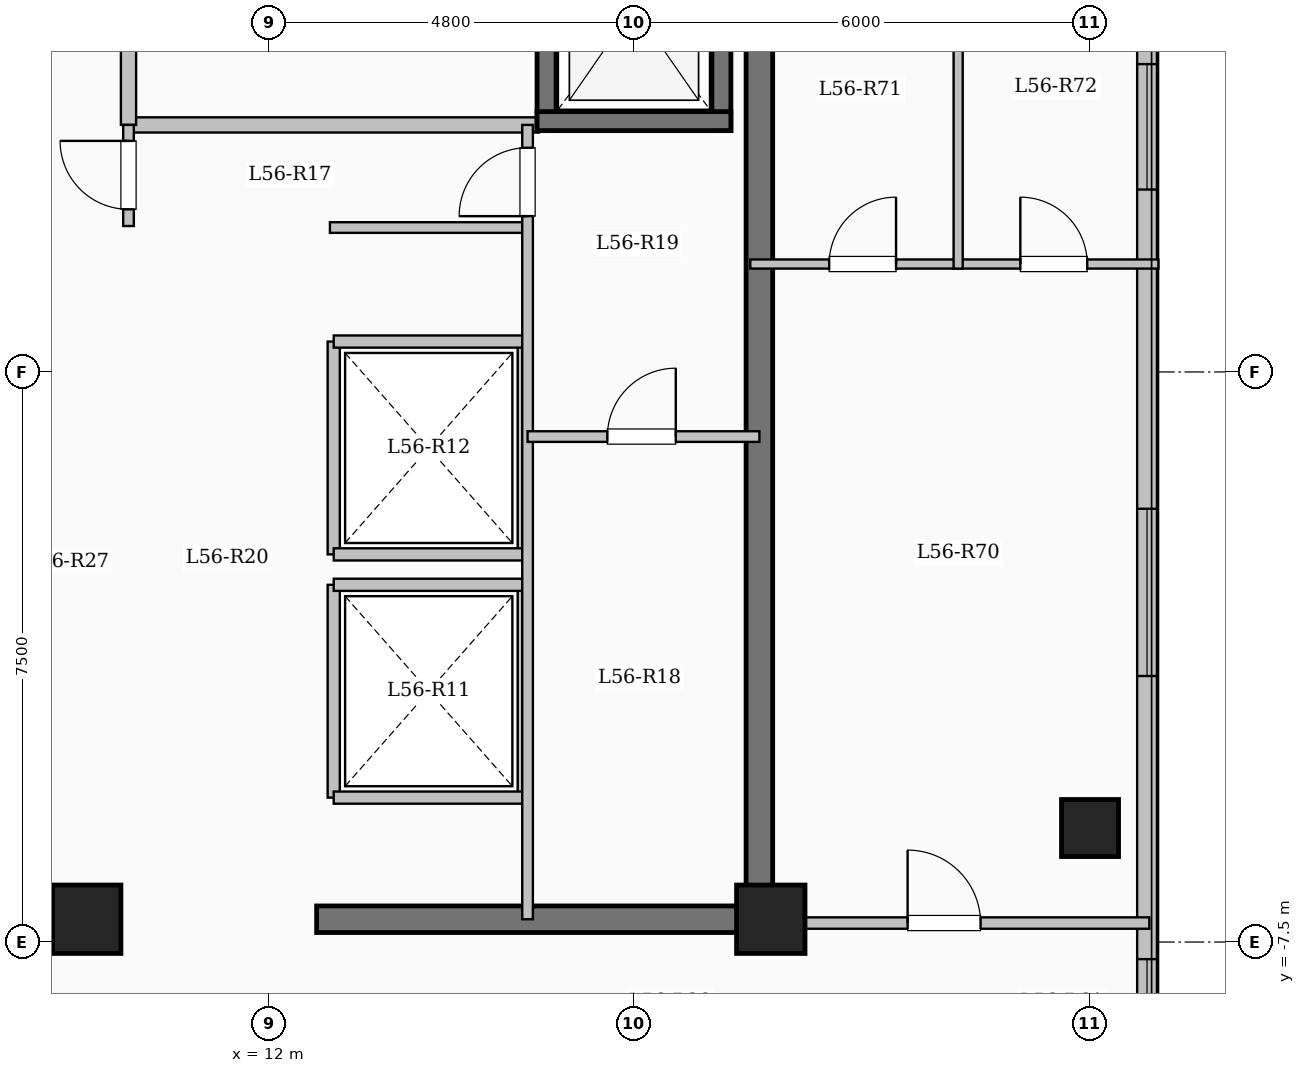
"""IFC4 building model, lengths in metres.
Left out: names, types, materials, properties, quantities, classifications, styles, units other than length and angle.
Written with IfcOpenShell. Run it as: python <this file> out.ifc"""

import sys

from ifc_helpers import new_model, si_unit, direction, frame, frame_2d, origin, origin_2d, place, context, subcontext, project, spatial, rectangle, extrude, element, fill, save


model = new_model("IFC4")
c1 = context("Model", 3, precision=1e-05, world=origin(), true_north=direction((0.0, 1.0)))
c2 = subcontext(c1, "Body", "Model", "MODEL_VIEW")
j1 = project(units=[si_unit("LENGTHUNIT", "METRE"), si_unit("PLANEANGLEUNIT", "RADIAN")], contexts=[c1])
p1 = place(None, origin())
s1 = spatial("IfcSite", under=j1, at=p1, CompositionType="ELEMENT")
p2 = place(p1, origin())
s2 = spatial("IfcBuilding", under=s1, at=p2, CompositionType="ELEMENT")
p3 = place(p2, frame((0.0, 0.0, 207.0)))
s3 = spatial("IfcBuildingStorey", under=s2, at=p3, CompositionType="ELEMENT", Elevation=207.0)
for number, where, z_axis, x_axis in (
    (1, (9.6, -7.2, 0.0), (0.0, 0.0, 1.0), (1.0, 0.0, 0.0)),
    (2, (18.6, -7.2, 0.0), (0.0, 0.0, 1.0), (1.0, 0.0, 0.0)),
):
    element("IfcColumn", number, at=place(p3, frame(where, z_axis=z_axis, x_axis=x_axis)), inside=s3, PredefinedType="COLUMN", context=c2, shape_type="SweptSolid", body=[
        extrude(rectangle(XDim=0.9, YDim=0.9, at=origin_2d()), origin(), (0.0, 0.0, 1.0), 3.35),
    ])
p4 = place(p3, frame((22.8, -6.0, 0.0), z_axis=(0.0, 0.0, 1.0), x_axis=(1.0, 0.0, 0.0)))
e3 = element("IfcColumn", 3, at=p4, inside=s3, PredefinedType="COLUMN", context=c2, shape_type="SweptSolid", body=[
    extrude(rectangle(XDim=0.75, YDim=0.75, at=origin_2d()), origin(), (0.0, 0.0, 1.0), 3.35),
])
p5 = place(p3, frame((23.55, 17.25, 0.0), z_axis=(0.0, 0.0, 1.0), x_axis=(0.0, -1.0, 0.0)))
e4 = element("IfcWall", 4, at=p5, inside=s3, PredefinedType="SOLIDWALL", context=c2, shape_type="SweptSolid", body=[
    extrude(rectangle(XDim=34.5, YDim=0.26, at=frame_2d((17.25, 0.0))), origin(), (0.0, 0.0, 1.0), 3.1),
])
p6 = place(p5, frame((1.375, 0.0, 0.9)))
e5 = element("IfcOpeningElement", 5, at=p6, cuts=e4, PredefinedType="OPENING", context=c2, shape_type="SweptSolid", body=[
    extrude(rectangle(XDim=2.0, YDim=1.7, at=frame_2d((1.0, 0.85))), frame((0.0, 0.14, 0.0), z_axis=(0.0, -1.0, 0.0), x_axis=(1.0, 0.0, 0.0)), (0.0, 0.0, 1.0), 0.28),
])
p7 = place(p5, frame((5.125, 0.0, 0.95)))
e6 = element("IfcOpeningElement", 6, at=p7, cuts=e4, PredefinedType="OPENING", context=c2, shape_type="SweptSolid", body=[
    extrude(rectangle(XDim=1.0, YDim=1.5, at=frame_2d((0.5, 0.75))), frame((0.0, 0.14, 0.0), z_axis=(0.0, -1.0, 0.0), x_axis=(1.0, 0.0, 0.0)), (0.0, 0.0, 1.0), 0.28),
])
p8 = place(p5, frame((8.375, 0.0, 0.9)))
e7 = element("IfcOpeningElement", 7, at=p8, cuts=e4, PredefinedType="OPENING", context=c2, shape_type="SweptSolid", body=[
    extrude(rectangle(XDim=2.0, YDim=1.7, at=frame_2d((1.0, 0.85))), frame((0.0, 0.14, 0.0), z_axis=(0.0, -1.0, 0.0), x_axis=(1.0, 0.0, 0.0)), (0.0, 0.0, 1.0), 0.28),
])
p9 = place(p5, frame((13.2, 0.0, 0.9)))
e8 = element("IfcOpeningElement", 8, at=p9, cuts=e4, PredefinedType="OPENING", context=c2, shape_type="SweptSolid", body=[
    extrude(rectangle(XDim=1.65, YDim=1.6, at=frame_2d((0.825, 0.8))), frame((0.0, 0.14, 0.0), z_axis=(0.0, -1.0, 0.0), x_axis=(1.0, 0.0, 0.0)), (0.0, 0.0, 1.0), 0.28),
])
p10 = place(p5, frame((19.05, 0.0, 0.9)))
e9 = element("IfcOpeningElement", 9, at=p10, cuts=e4, PredefinedType="OPENING", context=c2, shape_type="SweptSolid", body=[
    extrude(rectangle(XDim=2.2, YDim=1.75, at=frame_2d((1.1, 0.875))), frame((0.0, 0.14, 0.0), z_axis=(0.0, -1.0, 0.0), x_axis=(1.0, 0.0, 0.0)), (0.0, 0.0, 1.0), 0.28),
])
p11 = place(p5, frame((24.975, 0.0, 0.95)))
e10 = element("IfcOpeningElement", 10, at=p11, cuts=e4, PredefinedType="OPENING", context=c2, shape_type="SweptSolid", body=[
    extrude(rectangle(XDim=1.2, YDim=1.5, at=frame_2d((0.6, 0.75))), frame((0.0, 0.14, 0.0), z_axis=(0.0, -1.0, 0.0), x_axis=(1.0, 0.0, 0.0)), (0.0, 0.0, 1.0), 0.28),
])
p12 = place(p5, frame((29.475, 0.0, 0.9)))
e11 = element("IfcOpeningElement", 11, at=p12, cuts=e4, PredefinedType="OPENING", context=c2, shape_type="SweptSolid", body=[
    extrude(rectangle(XDim=2.2, YDim=1.75, at=frame_2d((1.1, 0.875))), frame((0.0, 0.14, 0.0), z_axis=(0.0, -1.0, 0.0), x_axis=(1.0, 0.0, 0.0)), (0.0, 0.0, 1.0), 0.28),
])
p13 = place(p3, frame((10.15, 3.25, 0.0), z_axis=(0.0, 0.0, 1.0), x_axis=(1.0, 0.0, 0.0)))
e12 = element("IfcWall", 12, at=p13, inside=s3, PredefinedType="SOLIDWALL", context=c2, shape_type="SweptSolid", body=[
    extrude(rectangle(XDim=5.4, YDim=0.2, at=frame_2d((2.7, 0.0))), origin(), (0.0, 0.0, 1.0), 3.1),
])
p14 = place(p3, frame((10.15, 3.25, 0.0), z_axis=(0.0, 0.0, 1.0), x_axis=(0.0, 1.0, 0.0)))
e13 = element("IfcWall", 13, at=p14, inside=s3, PredefinedType="SOLIDWALL", context=c2, shape_type="SweptSolid", body=[
    extrude(rectangle(XDim=3.25, YDim=0.2, at=frame_2d((1.625, 0.0))), origin(), (0.0, 0.0, 1.0), 3.1),
])
p15 = place(p14, frame((1.1, 0.0, 0.0)))
e14 = element("IfcOpeningElement", 14, at=p15, cuts=e13, PredefinedType="OPENING", context=c2, shape_type="SweptSolid", body=[
    extrude(rectangle(XDim=1.02, YDim=2.15, at=frame_2d((0.51, 1.075))), frame((0.0, 0.11, 0.0), z_axis=(0.0, -1.0, 0.0), x_axis=(1.0, 0.0, 0.0)), (0.0, 0.0, 1.0), 0.22),
])
p16 = place(p3, frame((15.65, 3.175, 0.0), z_axis=(0.0, 0.0, 1.0), x_axis=(0.0, 1.0, 0.0)))
e15 = element("IfcWall", 15, at=p16, inside=s3, PredefinedType="SHEAR", context=c2, shape_type="SweptSolid", body=[
    extrude(rectangle(XDim=3.25, YDim=0.25, at=frame_2d((1.625, 0.0))), origin(), (0.0, 0.0, 1.0), 3.35),
])
p17 = place(p16, frame((1.075, 0.0, 0.0)))
e16 = element("IfcOpeningElement", 16, at=p17, cuts=e15, PredefinedType="OPENING", context=c2, shape_type="SweptSolid", body=[
    extrude(rectangle(XDim=1.1, YDim=2.15, at=frame_2d((0.55, 1.075))), frame((0.0, 0.135, 0.0), z_axis=(0.0, -1.0, 0.0), x_axis=(1.0, 0.0, 0.0)), (0.0, 0.0, 1.0), 0.27),
])
p18 = place(p3, frame((17.95, 3.175, 0.0), z_axis=(0.0, 0.0, 1.0), x_axis=(0.0, 1.0, 0.0)))
e17 = element("IfcWall", 17, at=p18, inside=s3, PredefinedType="SHEAR", context=c2, shape_type="SweptSolid", body=[
    extrude(rectangle(XDim=3.25, YDim=0.25, at=frame_2d((1.625, 0.0))), origin(), (0.0, 0.0, 1.0), 3.35),
])
p19 = place(p3, frame((15.525, 3.3, 0.0), z_axis=(0.0, 0.0, 1.0), x_axis=(1.0, 0.0, 0.0)))
e18 = element("IfcWall", 18, at=p19, inside=s3, PredefinedType="SHEAR", context=c2, shape_type="SweptSolid", body=[
    extrude(rectangle(XDim=2.55, YDim=0.25, at=frame_2d((1.275, 0.0))), origin(), (0.0, 0.0, 1.0), 3.35),
])
for number, where, z_axis, x_axis in (
    (19, (12.85, -5.6, 0.0), (0.0, 0.0, 1.0), (0.0, 1.0, 0.0)),
    (20, (15.35, -5.6, 0.0), (0.0, 0.0, 1.0), (0.0, 1.0, 0.0)),
):
    element("IfcWall", number, at=place(p3, frame(where, z_axis=z_axis, x_axis=x_axis)), inside=s3, PredefinedType="SOLIDWALL", context=c2, shape_type="SweptSolid", body=[
        extrude(rectangle(XDim=2.8, YDim=0.16, at=frame_2d((1.4, 0.0))), origin(), (0.0, 0.0, 1.0), 3.1),
    ])
for number, where, z_axis, x_axis in (
    (21, (12.85, -5.6, 0.0), (0.0, 0.0, 1.0), (1.0, 0.0, 0.0)),
    (22, (12.85, -2.8, 0.0), (0.0, 0.0, 1.0), (1.0, 0.0, 0.0)),
):
    element("IfcWall", number, at=place(p3, frame(where, z_axis=z_axis, x_axis=x_axis)), inside=s3, PredefinedType="SOLIDWALL", context=c2, shape_type="SweptSolid", body=[
        extrude(rectangle(XDim=2.5, YDim=0.16, at=frame_2d((1.25, 0.0))), origin(), (0.0, 0.0, 1.0), 3.1),
    ])
for number, where, z_axis, x_axis in (
    (23, (12.85, -2.4, 0.0), (0.0, 0.0, 1.0), (0.0, 1.0, 0.0)),
    (24, (15.35, -2.4, 0.0), (0.0, 0.0, 1.0), (0.0, 1.0, 0.0)),
):
    element("IfcWall", number, at=place(p3, frame(where, z_axis=z_axis, x_axis=x_axis)), inside=s3, PredefinedType="SOLIDWALL", context=c2, shape_type="SweptSolid", body=[
        extrude(rectangle(XDim=2.8, YDim=0.16, at=frame_2d((1.4, 0.0))), origin(), (0.0, 0.0, 1.0), 3.1),
    ])
for number, where, z_axis, x_axis in (
    (25, (12.85, -2.4, 0.0), (0.0, 0.0, 1.0), (1.0, 0.0, 0.0)),
    (26, (12.85, 0.4, 0.0), (0.0, 0.0, 1.0), (1.0, 0.0, 0.0)),
):
    element("IfcWall", number, at=place(p3, frame(where, z_axis=z_axis, x_axis=x_axis)), inside=s3, PredefinedType="SOLIDWALL", context=c2, shape_type="SweptSolid", body=[
        extrude(rectangle(XDim=2.5, YDim=0.16, at=frame_2d((1.25, 0.0))), origin(), (0.0, 0.0, 1.0), 3.1),
    ])
p20 = place(p3, frame((18.45, -7.375, 0.0), z_axis=(0.0, 0.0, 1.0), x_axis=(0.0, 1.0, 0.0)))
e27 = element("IfcWall", 27, at=p20, inside=s3, PredefinedType="SHEAR", context=c2, shape_type="SweptSolid", body=[
    extrude(rectangle(XDim=14.05, YDim=0.35, at=frame_2d((7.025, 0.0))), origin(), (0.0, 0.0, 1.0), 3.35),
])
p21 = place(p3, frame((12.625, -7.2, 0.0), z_axis=(0.0, 0.0, 1.0), x_axis=(1.0, 0.0, 0.0)))
e28 = element("IfcWall", 28, at=p21, inside=s3, PredefinedType="SHEAR", context=c2, shape_type="SweptSolid", body=[
    extrude(rectangle(XDim=6.0, YDim=0.35, at=frame_2d((3.0, 0.0))), origin(), (0.0, 0.0, 1.0), 3.35),
])
p22 = place(p3, frame((12.8, 1.9, 0.0), z_axis=(0.0, 0.0, 1.0), x_axis=(1.0, 0.0, 0.0)))
e29 = element("IfcWall", 29, at=p22, inside=s3, PredefinedType="PARTITIONING", context=c2, shape_type="SweptSolid", body=[
    extrude(rectangle(XDim=2.6, YDim=0.14, at=frame_2d((1.3, 0.0))), origin(), (0.0, 0.0, 1.0), 3.1),
])
p23 = place(p3, frame((10.15, 1.92, 0.0), z_axis=(0.0, 0.0, 1.0), x_axis=(0.0, 1.0, 0.0)))
e30 = element("IfcWall", 30, at=p23, inside=s3, PredefinedType="PARTITIONING", context=c2, shape_type="SweptSolid", body=[
    extrude(rectangle(XDim=1.33, YDim=0.14, at=frame_2d((0.665, 0.0))), origin(), (0.0, 0.0, 1.0), 3.1),
])
p24 = place(p23, frame((0.22, 0.0, 0.0)))
e31 = element("IfcOpeningElement", 31, at=p24, cuts=e30, PredefinedType="OPENING", context=c2, shape_type="SweptSolid", body=[
    extrude(rectangle(XDim=0.9, YDim=2.08, at=frame_2d((0.45, 1.04))), frame((0.0, 0.08, 0.0), z_axis=(0.0, -1.0, 0.0), x_axis=(1.0, 0.0, 0.0)), (0.0, 0.0, 1.0), 0.16),
])
p25 = place(p3, frame((15.4, -7.2, 0.0), z_axis=(0.0, 0.0, 1.0), x_axis=(0.0, 1.0, 0.0)))
e32 = element("IfcWall", 32, at=p25, inside=s3, PredefinedType="PARTITIONING", context=c2, shape_type="SweptSolid", body=[
    extrude(rectangle(XDim=10.45, YDim=0.14, at=frame_2d((5.225, 0.0))), origin(), (0.0, 0.0, 1.0), 3.1),
])
p26 = place(p25, frame((9.25, 0.0, 0.0)))
e33 = element("IfcOpeningElement", 33, at=p26, cuts=e32, PredefinedType="OPENING", context=c2, shape_type="SweptSolid", body=[
    extrude(rectangle(XDim=0.9, YDim=2.08, at=frame_2d((0.45, 1.04))), frame((0.0, 0.08, 0.0), z_axis=(0.0, -1.0, 0.0), x_axis=(1.0, 0.0, 0.0)), (0.0, 0.0, 1.0), 0.16),
])
p27 = place(p3, frame((15.4, -0.85, 0.0), z_axis=(0.0, 0.0, 1.0), x_axis=(1.0, 0.0, 0.0)))
e34 = element("IfcWall", 34, at=p27, inside=s3, PredefinedType="PARTITIONING", context=c2, shape_type="SweptSolid", body=[
    extrude(rectangle(XDim=3.05, YDim=0.14, at=frame_2d((1.525, 0.0))), origin(), (0.0, 0.0, 1.0), 3.1),
])
p28 = place(p27, frame((1.05, 0.0, 0.0)))
e35 = element("IfcOpeningElement", 35, at=p28, cuts=e34, PredefinedType="OPENING", context=c2, shape_type="SweptSolid", body=[
    extrude(rectangle(XDim=0.9, YDim=2.08, at=frame_2d((0.45, 1.04))), frame((0.0, 0.08, 0.0), z_axis=(0.0, -1.0, 0.0), x_axis=(1.0, 0.0, 0.0)), (0.0, 0.0, 1.0), 0.16),
])
p29 = place(p3, frame((18.45, -7.25, 0.0), z_axis=(0.0, 0.0, 1.0), x_axis=(1.0, 0.0, 0.0)))
e36 = element("IfcWall", 36, at=p29, inside=s3, PredefinedType="PARTITIONING", context=c2, shape_type="SweptSolid", body=[
    extrude(rectangle(XDim=5.13, YDim=0.15, at=frame_2d((2.565, 0.0))), origin(), (0.0, 0.0, 1.0), 3.1),
])
p30 = place(p29, frame((1.95, 0.0, 0.0)))
e37 = element("IfcOpeningElement", 37, at=p30, cuts=e36, PredefinedType="OPENING", context=c2, shape_type="SweptSolid", body=[
    extrude(rectangle(XDim=0.96, YDim=2.15, at=frame_2d((0.48, 1.075))), frame((0.0, 0.085, 0.0), z_axis=(0.0, -1.0, 0.0), x_axis=(1.0, 0.0, 0.0)), (0.0, 0.0, 1.0), 0.17),
])
p31 = place(p3, frame((18.33, 1.42, 0.0), z_axis=(0.0, 0.0, 1.0), x_axis=(1.0, 0.0, 0.0)))
e38 = element("IfcWall", 38, at=p31, inside=s3, PredefinedType="PARTITIONING", context=c2, shape_type="SweptSolid", body=[
    extrude(rectangle(XDim=5.37, YDim=0.12, at=frame_2d((2.685, 0.0))), origin(), (0.0, 0.0, 1.0), 3.1),
])
p32 = place(p31, frame((1.038, 0.0, 0.0)))
e39 = element("IfcOpeningElement", 39, at=p32, cuts=e38, PredefinedType="OPENING", context=c2, shape_type="SweptSolid", body=[
    extrude(rectangle(XDim=0.88, YDim=2.1, at=frame_2d((0.44, 1.05))), frame((0.0, 0.07, 0.0), z_axis=(0.0, -1.0, 0.0), x_axis=(1.0, 0.0, 0.0)), (0.0, 0.0, 1.0), 0.14),
])
p33 = place(p31, frame((3.553, 0.0, 0.0)))
e40 = element("IfcOpeningElement", 40, at=p33, cuts=e38, PredefinedType="OPENING", context=c2, shape_type="SweptSolid", body=[
    extrude(rectangle(XDim=0.88, YDim=2.1, at=frame_2d((0.44, 1.05))), frame((0.0, 0.07, 0.0), z_axis=(0.0, -1.0, 0.0), x_axis=(1.0, 0.0, 0.0)), (0.0, 0.0, 1.0), 0.14),
])
p34 = place(p3, frame((21.065, 1.36, 0.0), z_axis=(0.0, 0.0, 1.0), x_axis=(0.0, 1.0, 0.0)))
e41 = element("IfcWall", 41, at=p34, inside=s3, PredefinedType="PARTITIONING", context=c2, shape_type="SweptSolid", body=[
    extrude(rectangle(XDim=3.58, YDim=0.12, at=frame_2d((1.79, 0.0))), origin(), (0.0, 0.0, 1.0), 3.1),
])
p35 = place(p9, origin())
e42 = element("IfcWindow", 42, at=p35, inside=s3, PartitioningType="SINGLE_PANEL", PredefinedType="WINDOW", context=c2, shape_type="SweptSolid", body=[
    extrude(rectangle(XDim=1.65, YDim=1.6, at=frame_2d((0.825, 0.8))), frame((0.0, 0.03, 0.0), z_axis=(0.0, -1.0, 0.0), x_axis=(1.0, 0.0, 0.0)), (0.0, 0.0, 1.0), 0.06),
])
fill(e8, e42)
p36 = place(p10, origin())
e43 = element("IfcWindow", 43, at=p36, inside=s3, PartitioningType="SINGLE_PANEL", PredefinedType="WINDOW", context=c2, shape_type="SweptSolid", body=[
    extrude(rectangle(XDim=2.2, YDim=1.75, at=frame_2d((1.1, 0.875))), frame((0.0, 0.03, 0.0), z_axis=(0.0, -1.0, 0.0), x_axis=(1.0, 0.0, 0.0)), (0.0, 0.0, 1.0), 0.06),
])
fill(e9, e43)
p37 = place(p11, origin())
e44 = element("IfcWindow", 44, at=p37, inside=s3, PartitioningType="SINGLE_PANEL", PredefinedType="WINDOW", context=c2, shape_type="SweptSolid", body=[
    extrude(rectangle(XDim=1.2, YDim=1.5, at=frame_2d((0.6, 0.75))), frame((0.0, 0.03, 0.0), z_axis=(0.0, -1.0, 0.0), x_axis=(1.0, 0.0, 0.0)), (0.0, 0.0, 1.0), 0.06),
])
fill(e10, e44)
p38 = place(p24, origin())
e45 = element("IfcDoor", 45, at=p38, inside=s3, OperationType="SINGLE_SWING_RIGHT", PredefinedType="DOOR", context=c2, shape_type="SweptSolid", body=[
    extrude(rectangle(XDim=0.9, YDim=2.08, at=frame_2d((0.45, 1.04))), frame((0.0, 0.025, 0.0), z_axis=(0.0, -1.0, 0.0), x_axis=(1.0, 0.0, 0.0)), (0.0, 0.0, 1.0), 0.05),
])
fill(e31, e45)
p39 = place(p26, origin())
e46 = element("IfcDoor", 46, at=p39, inside=s3, OperationType="SINGLE_SWING_LEFT", PredefinedType="DOOR", context=c2, shape_type="SweptSolid", body=[
    extrude(rectangle(XDim=0.9, YDim=2.08, at=frame_2d((0.45, 1.04))), frame((0.0, 0.025, 0.0), z_axis=(0.0, -1.0, 0.0), x_axis=(1.0, 0.0, 0.0)), (0.0, 0.0, 1.0), 0.05),
])
fill(e33, e46)
p40 = place(p28, origin())
e47 = element("IfcDoor", 47, at=p40, inside=s3, OperationType="SINGLE_SWING_RIGHT", PredefinedType="DOOR", context=c2, shape_type="SweptSolid", body=[
    extrude(rectangle(XDim=0.9, YDim=2.08, at=frame_2d((0.45, 1.04))), frame((0.0, 0.025, 0.0), z_axis=(0.0, -1.0, 0.0), x_axis=(1.0, 0.0, 0.0)), (0.0, 0.0, 1.0), 0.05),
])
fill(e35, e47)
p41 = place(p30, origin())
e48 = element("IfcDoor", 48, at=p41, inside=s3, OperationType="SINGLE_SWING_LEFT", PredefinedType="DOOR", context=c2, shape_type="SweptSolid", body=[
    extrude(rectangle(XDim=0.96, YDim=2.15, at=frame_2d((0.48, 1.075))), frame((0.0, 0.025, 0.0), z_axis=(0.0, -1.0, 0.0), x_axis=(1.0, 0.0, 0.0)), (0.0, 0.0, 1.0), 0.05),
])
fill(e37, e48)
p42 = place(p32, origin())
e49 = element("IfcDoor", 49, at=p42, inside=s3, OperationType="SINGLE_SWING_RIGHT", PredefinedType="DOOR", context=c2, shape_type="SweptSolid", body=[
    extrude(rectangle(XDim=0.88, YDim=2.1, at=frame_2d((0.44, 1.05))), frame((0.0, 0.025, 0.0), z_axis=(0.0, -1.0, 0.0), x_axis=(1.0, 0.0, 0.0)), (0.0, 0.0, 1.0), 0.05),
])
fill(e39, e49)
p43 = place(p33, origin())
e50 = element("IfcDoor", 50, at=p43, inside=s3, OperationType="SINGLE_SWING_LEFT", PredefinedType="DOOR", context=c2, shape_type="SweptSolid", body=[
    extrude(rectangle(XDim=0.88, YDim=2.1, at=frame_2d((0.44, 1.05))), frame((0.0, 0.025, 0.0), z_axis=(0.0, -1.0, 0.0), x_axis=(1.0, 0.0, 0.0)), (0.0, 0.0, 1.0), 0.05),
])
fill(e40, e50)
save(model, sys.argv[1])
